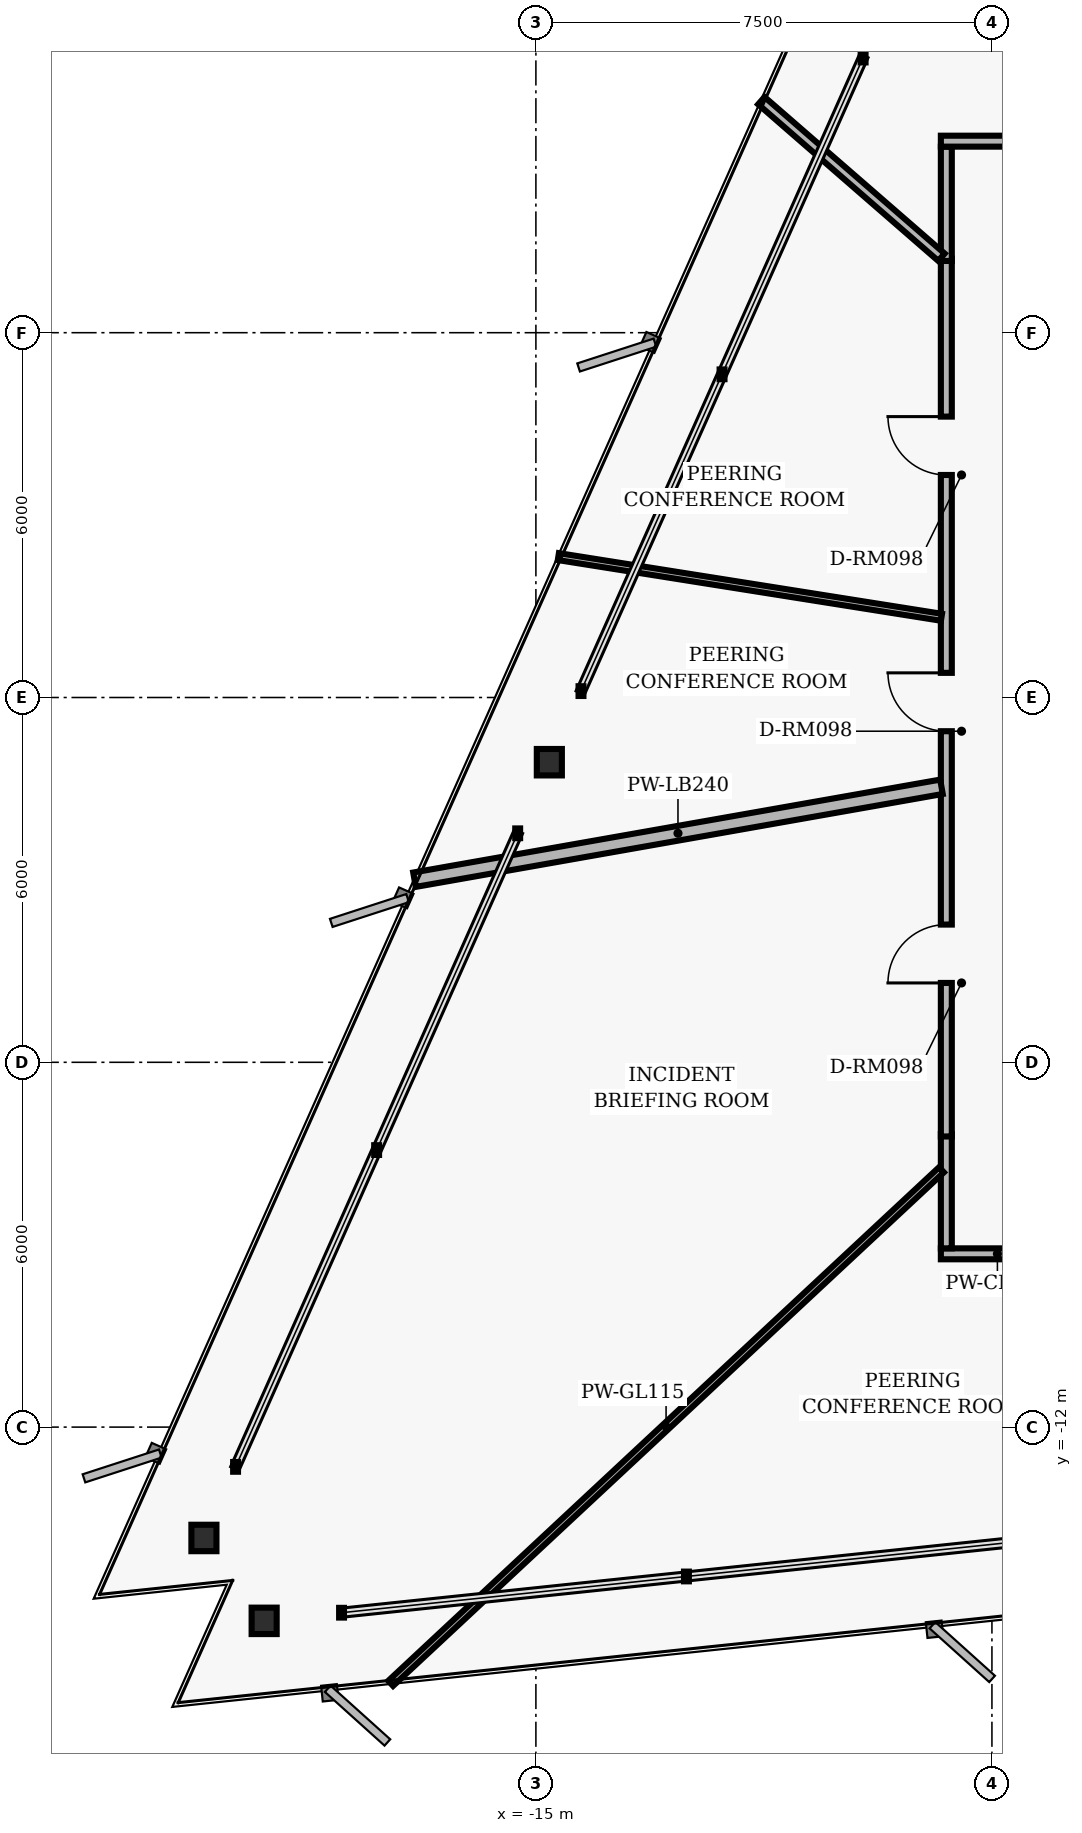
"""IFC4 building model, lengths in metres.
Left out: names, types, materials, properties, quantities, classifications, styles, units other than length and angle.
Written with IfcOpenShell. Run it as: python <this file> out.ifc"""

import sys

from ifc_helpers import new_model, si_unit, direction, frame, frame_2d, origin, origin_2d, place, context, subcontext, project, spatial, rectangle, i_section, extrude, element, fill, save


model = new_model("IFC4")
c1 = context("Model", 3, precision=1e-05, world=origin(), true_north=direction((0.0, 1.0)))
c2 = subcontext(c1, "Body", "Model", "MODEL_VIEW")
j1 = project(units=[si_unit("LENGTHUNIT", "METRE"), si_unit("PLANEANGLEUNIT", "RADIAN")], contexts=[c1])
p1 = place(None, origin())
s1 = spatial("IfcSite", under=j1, at=p1, CompositionType="ELEMENT")
p2 = place(p1, origin())
s2 = spatial("IfcBuilding", under=s1, at=p2, CompositionType="ELEMENT")
p3 = place(p2, frame((0.0, 0.0, 113.76)))
s3 = spatial("IfcBuildingStorey", under=s2, at=p3, CompositionType="ELEMENT", Elevation=113.76)
for number, where, z_axis, x_axis in (
    (1, (-14.779, -1.064, 0.0), (0.0, 0.0, 1.0), (1.0, 0.0, 0.0)),
    (2, (-20.46, -13.823, 0.0), (0.0, 0.0, 1.0), (1.0, 0.0, 0.0)),
    (3, (-19.469, -15.187, 0.0), (0.0, 0.0, 1.0), (1.0, 0.0, 0.0)),
):
    element("IfcColumn", number, at=place(p3, frame(where, z_axis=z_axis, x_axis=x_axis)), inside=s3, PredefinedType="COLUMN", context=c2, shape_type="SweptSolid", body=[
        extrude(i_section(OverallWidth=0.412, OverallDepth=0.435, WebThickness=0.036, FlangeThickness=0.057, FilletRadius=0.022, at=origin_2d()), origin(), (0.0, 0.0, 1.0), 3.04),
    ])
p4 = place(p3, frame((-6.48, -9.15, 0.0), z_axis=(0.0, 0.0, 1.0), x_axis=(-1.0, 0.0, 0.0)))
e4 = element("IfcWall", 4, at=p4, inside=s3, PredefinedType="PARTITIONING", context=c2, shape_type="SweptSolid", body=[
    extrude(rectangle(XDim=1.86, YDim=0.18, at=frame_2d((0.93, 0.0))), origin(), (0.0, 0.0, 1.0), 2.33),
])
p5 = place(p3, frame((-8.25, -9.06, 0.0), z_axis=(0.0, 0.0, 1.0), x_axis=(0.0, 1.0, 0.0)))
e5 = element("IfcWall", 5, at=p5, inside=s3, PredefinedType="PARTITIONING", context=c2, shape_type="SweptSolid", body=[
    extrude(rectangle(XDim=1.88, YDim=0.18, at=frame_2d((0.94, 0.0))), origin(), (0.0, 0.0, 1.0), 2.763),
])
p6 = place(p3, frame((-8.25, -7.22, 0.0), z_axis=(0.0, 0.0, 1.0), x_axis=(0.0, 1.0, 0.0)))
e6 = element("IfcWall", 6, at=p6, inside=s3, PredefinedType="PARTITIONING", context=c2, shape_type="SweptSolid", body=[
    extrude(rectangle(XDim=14.44, YDim=0.18, at=frame_2d((7.22, 0.0))), origin(), (0.0, 0.0, 1.0), 2.33),
])
p7 = place(p6, frame((6.665, 0.0, 0.0)))
e7 = element("IfcOpeningElement", 7, at=p7, cuts=e6, PredefinedType="OPENING", context=c2, shape_type="SweptSolid", body=[
    extrude(rectangle(XDim=0.96, YDim=2.02, at=frame_2d((0.48, 1.01))), frame((0.0, 0.1, 0.0), z_axis=(0.0, -1.0, 0.0), x_axis=(1.0, 0.0, 0.0)), (0.0, 0.0, 1.0), 0.2),
])
p8 = place(p6, frame((2.525, 0.0, 0.0)))
e8 = element("IfcOpeningElement", 8, at=p8, cuts=e6, PredefinedType="OPENING", context=c2, shape_type="SweptSolid", body=[
    extrude(rectangle(XDim=0.96, YDim=2.02, at=frame_2d((0.48, 1.01))), frame((0.0, 0.1, 0.0), z_axis=(0.0, -1.0, 0.0), x_axis=(1.0, 0.0, 0.0)), (0.0, 0.0, 1.0), 0.2),
])
p9 = place(p6, frame((10.88, 0.0, 0.0)))
e9 = element("IfcOpeningElement", 9, at=p9, cuts=e6, PredefinedType="OPENING", context=c2, shape_type="SweptSolid", body=[
    extrude(rectangle(XDim=0.96, YDim=2.02, at=frame_2d((0.48, 1.01))), frame((0.0, 0.1, 0.0), z_axis=(0.0, -1.0, 0.0), x_axis=(1.0, 0.0, 0.0)), (0.0, 0.0, 1.0), 0.2),
])
p10 = place(p3, frame((-8.25, 7.18, 0.0), z_axis=(0.0, 0.0, 1.0), x_axis=(0.0, 1.0, 0.0)))
e10 = element("IfcWall", 10, at=p10, inside=s3, PredefinedType="PARTITIONING", context=c2, shape_type="SweptSolid", body=[
    extrude(rectangle(XDim=1.88, YDim=0.18, at=frame_2d((0.94, 0.0))), origin(), (0.0, 0.0, 1.0), 2.763),
])
p11 = place(p3, frame((-8.34, 9.15, 0.0), z_axis=(0.0, 0.0, 1.0), x_axis=(1.0, 0.0, 0.0)))
e11 = element("IfcWall", 11, at=p11, inside=s3, PredefinedType="PARTITIONING", context=c2, shape_type="SweptSolid", body=[
    extrude(rectangle(XDim=1.86, YDim=0.18, at=frame_2d((0.93, 0.0))), origin(), (0.0, 0.0, 1.0), 2.763),
])
p12 = place(p3, frame((-8.33, -1.469, 0.0), z_axis=(0.0, 0.0, 1.0), x_axis=(-0.984804219106, -0.173668218255, 0.0)))
e12 = element("IfcWall", 12, at=p12, inside=s3, PredefinedType="PARTITIONING", context=c2, shape_type="SweptSolid", body=[
    extrude(rectangle(XDim=8.8, YDim=0.24, at=frame_2d((4.4, 0.0))), origin(), (0.0, 0.0, 1.0), 2.763),
])
p13 = place(p3, frame((-8.33, -7.768, 0.0), z_axis=(0.0, 0.0, 1.0), x_axis=(-0.731355419522, -0.681996517833, 0.0)))
e13 = element("IfcWall", 13, at=p13, inside=s3, PredefinedType="MOVABLE", context=c2, shape_type="SweptSolid", body=[
    extrude(rectangle(XDim=12.385, YDim=0.115, at=frame_2d((6.193, 0.0))), origin(), (0.0, 0.0, 1.0), 2.763),
])
p14 = place(p3, frame((-8.33, 7.241, 0.0), z_axis=(0.0, 0.0, 1.0), x_axis=(-0.754715330954, 0.656052413472, 0.0)))
e14 = element("IfcWall", 14, at=p14, inside=s3, PredefinedType="PARTITIONING", context=c2, shape_type="SweptSolid", body=[
    extrude(rectangle(XDim=3.925, YDim=0.16, at=frame_2d((1.962, 0.0))), origin(), (0.0, 0.0, 1.0), 2.763),
])
p15 = place(p3, frame((-8.33, 1.319, 0.0), z_axis=(0.0, 0.0, 1.0), x_axis=(-0.987684953503, 0.156455848798, 0.0)))
e15 = element("IfcWall", 15, at=p15, inside=s3, PredefinedType="MOVABLE", context=c2, shape_type="SweptSolid", body=[
    extrude(rectangle(XDim=6.379, YDim=0.115, at=frame_2d((3.189, 0.0))), origin(), (0.0, 0.0, 1.0), 2.763),
])
p16 = place(p7, origin())
e16 = element("IfcDoor", 16, at=p16, inside=s3, OperationType="SINGLE_SWING_RIGHT", PredefinedType="DOOR", context=c2, shape_type="SweptSolid", body=[
    extrude(rectangle(XDim=0.96, YDim=2.02, at=frame_2d((0.48, 1.01))), frame((0.0, 0.025, 0.0), z_axis=(0.0, -1.0, 0.0), x_axis=(1.0, 0.0, 0.0)), (0.0, 0.0, 1.0), 0.05),
])
fill(e7, e16)
p17 = place(p8, origin())
e17 = element("IfcDoor", 17, at=p17, inside=s3, OperationType="SINGLE_SWING_LEFT", PredefinedType="DOOR", context=c2, shape_type="SweptSolid", body=[
    extrude(rectangle(XDim=0.96, YDim=2.02, at=frame_2d((0.48, 1.01))), frame((0.0, 0.025, 0.0), z_axis=(0.0, -1.0, 0.0), x_axis=(1.0, 0.0, 0.0)), (0.0, 0.0, 1.0), 0.05),
])
fill(e8, e17)
p18 = place(p9, origin())
e18 = element("IfcDoor", 18, at=p18, inside=s3, OperationType="SINGLE_SWING_RIGHT", PredefinedType="DOOR", context=c2, shape_type="SweptSolid", body=[
    extrude(rectangle(XDim=0.96, YDim=2.02, at=frame_2d((0.48, 1.01))), frame((0.0, 0.025, 0.0), z_axis=(0.0, -1.0, 0.0), x_axis=(1.0, 0.0, 0.0)), (0.0, 0.0, 1.0), 0.05),
])
fill(e9, e18)
save(model, sys.argv[1])
